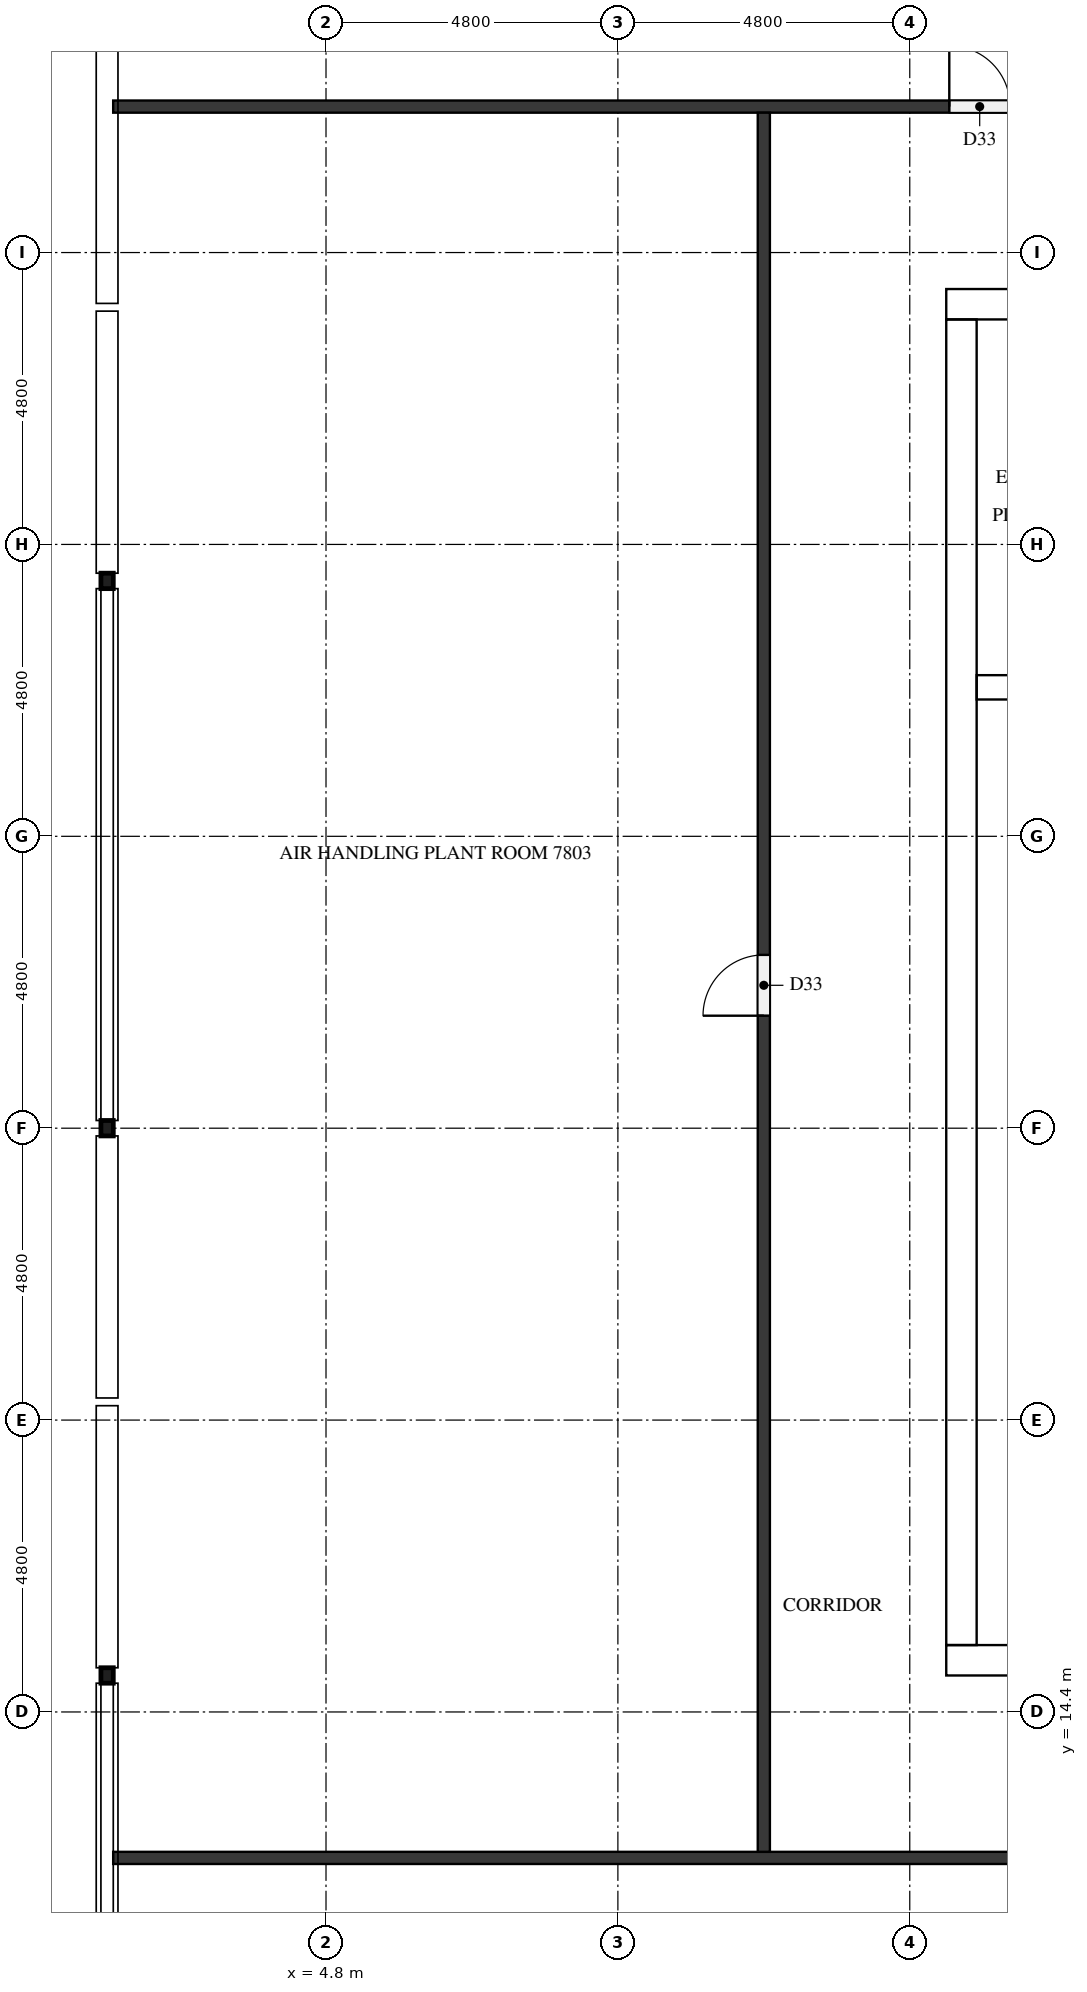
"""IFC4 building model, lengths in metres.
Left out: names, types, materials, properties, quantities, classifications, styles, units other than length and angle.
Written with IfcOpenShell. Run it as: python <this file> out.ifc"""

import sys

from ifc_helpers import new_model, si_unit, direction, frame, frame_2d, origin, origin_2d, place, context, subcontext, project, spatial, rectangle, hollow_rectangle, extrude, element, fill, save


model = new_model("IFC4")
c1 = context("Model", 3, precision=1e-05, world=origin(), true_north=direction((0.0, 1.0)))
c2 = subcontext(c1, "Body", "Model", "MODEL_VIEW")
j1 = project(units=[si_unit("LENGTHUNIT", "METRE"), si_unit("PLANEANGLEUNIT", "RADIAN")], contexts=[c1])
p1 = place(None, origin())
s1 = spatial("IfcSite", under=j1, at=p1, CompositionType="ELEMENT")
p2 = place(p1, origin())
s2 = spatial("IfcBuilding", under=s1, at=p2, CompositionType="ELEMENT")
p3 = place(p2, frame((0.0, 0.0, 301.1)))
s3 = spatial("IfcBuildingStorey", under=s2, at=p3, CompositionType="ELEMENT", Elevation=301.1)
p4 = place(p3, frame((15.0, 15.25, 0.0), z_axis=(0.0, 0.0, 1.0), x_axis=(1.0, 0.0, 0.0)))
e1 = element("IfcWall", 1, at=p4, inside=s3, PredefinedType="SHEAR", context=c2, shape_type="SweptSolid", body=[
    extrude(rectangle(XDim=32.4, YDim=0.5, at=frame_2d((16.2, 0.0))), origin(), (0.0, 0.0, 1.0), 4.4),
])
p5 = place(p4, frame((15.3, 0.0, 0.0)))
e2 = element("IfcOpeningElement", 2, at=p5, cuts=e1, PredefinedType="OPENING", context=c2, shape_type="SweptSolid", body=[
    extrude(rectangle(XDim=1.8, YDim=2.1, at=frame_2d((0.9, 1.05))), frame((0.0, 0.26, 0.0), z_axis=(0.0, -1.0, 0.0), x_axis=(1.0, 0.0, 0.0)), (0.0, 0.0, 1.0), 0.52),
])
p6 = place(p3, frame((15.0, 37.55, 0.0), z_axis=(0.0, 0.0, 1.0), x_axis=(1.0, 0.0, 0.0)))
e3 = element("IfcWall", 3, at=p6, inside=s3, PredefinedType="SHEAR", context=c2, shape_type="SweptSolid", body=[
    extrude(rectangle(XDim=32.4, YDim=0.5, at=frame_2d((16.2, 0.0))), origin(), (0.0, 0.0, 1.0), 4.4),
])
p7 = place(p6, frame((15.3, 0.0, 0.0)))
e4 = element("IfcOpeningElement", 4, at=p7, cuts=e3, PredefinedType="OPENING", context=c2, shape_type="SweptSolid", body=[
    extrude(rectangle(XDim=1.8, YDim=2.1, at=frame_2d((0.9, 1.05))), frame((0.0, 0.26, 0.0), z_axis=(0.0, -1.0, 0.0), x_axis=(1.0, 0.0, 0.0)), (0.0, 0.0, 1.0), 0.52),
])
p8 = place(p6, frame((1.282, 0.0, 0.0)))
e5 = element("IfcOpeningElement", 5, at=p8, cuts=e3, PredefinedType="OPENING", context=c2, shape_type="SweptSolid", body=[
    extrude(rectangle(XDim=1.0, YDim=2.1, at=frame_2d((0.5, 1.05))), frame((0.0, 0.26, 0.0), z_axis=(0.0, -1.0, 0.0), x_axis=(1.0, 0.0, 0.0)), (0.0, 0.0, 1.0), 0.52),
])
p9 = place(p6, frame((5.082, 0.0, 0.0)))
e6 = element("IfcOpeningElement", 6, at=p9, cuts=e3, PredefinedType="OPENING", context=c2, shape_type="SweptSolid", body=[
    extrude(rectangle(XDim=1.0, YDim=2.1, at=frame_2d((0.5, 1.05))), frame((0.0, 0.26, 0.0), z_axis=(0.0, -1.0, 0.0), x_axis=(1.0, 0.0, 0.0)), (0.0, 0.0, 1.0), 0.52),
])
p10 = place(p3, frame((15.25, 15.5, 0.0), z_axis=(0.0, 0.0, 1.0), x_axis=(0.0, 1.0, 0.0)))
e7 = element("IfcWall", 7, at=p10, inside=s3, PredefinedType="SHEAR", context=c2, shape_type="SweptSolid", body=[
    extrude(rectangle(XDim=21.8, YDim=0.5, at=frame_2d((10.9, 0.0))), origin(), (0.0, 0.0, 1.0), 4.4),
])
p11 = place(p10, frame((5.26, 0.0, 0.0)))
e8 = element("IfcOpeningElement", 8, at=p11, cuts=e7, PredefinedType="OPENING", context=c2, shape_type="SweptSolid", body=[
    extrude(rectangle(XDim=1.2, YDim=2.1, at=frame_2d((0.6, 1.05))), frame((0.0, 0.26, 0.0), z_axis=(0.0, -1.0, 0.0), x_axis=(1.0, 0.0, 0.0)), (0.0, 0.0, 1.0), 0.52),
])
p12 = place(p3, frame((15.5, 31.25, 0.0), z_axis=(0.0, 0.0, 1.0), x_axis=(1.0, 0.0, 0.0)))
e9 = element("IfcWall", 9, at=p12, inside=s3, PredefinedType="SHEAR", context=c2, shape_type="SweptSolid", body=[
    extrude(rectangle(XDim=7.4, YDim=0.4, at=frame_2d((3.7, 0.0))), origin(), (0.0, 0.0, 1.0), 4.4),
])
for number, where, z_axis, x_axis in (
    (10, (1.2, 33.0, 0.0), (0.0, 0.0, 1.0), (1.0, 0.0, 0.0)),
    (11, (1.2, 24.0, 0.0), (0.0, 0.0, 1.0), (1.0, 0.0, 0.0)),
    (12, (1.2, 15.0, 0.0), (0.0, 0.0, 1.0), (1.0, 0.0, 0.0)),
):
    element("IfcColumn", number, at=place(p3, frame(where, z_axis=z_axis, x_axis=x_axis)), inside=s3, PredefinedType="COLUMN", context=c2, shape_type="SweptSolid", body=[
        extrude(hollow_rectangle(XDim=0.203, YDim=0.254, WallThickness=0.01, InnerFilletRadius=0.004, OuterFilletRadius=0.013, at=origin_2d()), origin(), (0.0, 0.0, 1.0), 4.4),
    ])
p13 = place(p3, frame((56.3, 12.0, 0.0), z_axis=(0.0, 0.0, 1.0), x_axis=(-1.0, 0.0, 0.0)))
e13 = element("IfcWall", 13, at=p13, inside=s3, PredefinedType="PARTITIONING", context=c2, shape_type="SweptSolid", body=[
    extrude(rectangle(XDim=55.0, YDim=0.2, at=frame_2d((27.5, 0.0))), origin(), (0.0, 0.0, 1.0), 4.4),
])
p14 = place(p13, frame((37.75, 0.0, 0.0)))
e14 = element("IfcOpeningElement", 14, at=p14, cuts=e13, PredefinedType="OPENING", context=c2, shape_type="SweptSolid", body=[
    extrude(rectangle(XDim=1.0, YDim=2.1, at=frame_2d((0.5, 1.05))), frame((0.0, 0.11, 0.0), z_axis=(0.0, -1.0, 0.0), x_axis=(1.0, 0.0, 0.0)), (0.0, 0.0, 1.0), 0.22),
])
p15 = place(p13, frame((18.55, 0.0, 0.0)))
e15 = element("IfcOpeningElement", 15, at=p15, cuts=e13, PredefinedType="OPENING", context=c2, shape_type="SweptSolid", body=[
    extrude(rectangle(XDim=1.0, YDim=2.1, at=frame_2d((0.5, 1.05))), frame((0.0, 0.11, 0.0), z_axis=(0.0, -1.0, 0.0), x_axis=(1.0, 0.0, 0.0)), (0.0, 0.0, 1.0), 0.22),
])
p16 = place(p3, frame((1.3, 40.8, 0.0), z_axis=(0.0, 0.0, 1.0), x_axis=(1.0, 0.0, 0.0)))
e16 = element("IfcWall", 16, at=p16, inside=s3, PredefinedType="PARTITIONING", context=c2, shape_type="SweptSolid", body=[
    extrude(rectangle(XDim=55.0, YDim=0.2, at=frame_2d((27.5, 0.0))), origin(), (0.0, 0.0, 1.0), 4.4),
])
p17 = place(p16, frame((13.75, 0.0, 0.0)))
e17 = element("IfcOpeningElement", 17, at=p17, cuts=e16, PredefinedType="OPENING", context=c2, shape_type="SweptSolid", body=[
    extrude(rectangle(XDim=1.0, YDim=2.1, at=frame_2d((0.5, 1.05))), frame((0.0, 0.11, 0.0), z_axis=(0.0, -1.0, 0.0), x_axis=(1.0, 0.0, 0.0)), (0.0, 0.0, 1.0), 0.22),
])
p18 = place(p16, frame((32.95, 0.0, 0.0)))
e18 = element("IfcOpeningElement", 18, at=p18, cuts=e16, PredefinedType="OPENING", context=c2, shape_type="SweptSolid", body=[
    extrude(rectangle(XDim=1.0, YDim=2.1, at=frame_2d((0.5, 1.05))), frame((0.0, 0.11, 0.0), z_axis=(0.0, -1.0, 0.0), x_axis=(1.0, 0.0, 0.0)), (0.0, 0.0, 1.0), 0.22),
])
p19 = place(p3, frame((12.0, 12.1, 0.0), z_axis=(0.0, 0.0, 1.0), x_axis=(0.0, 1.0, 0.0)))
e19 = element("IfcWall", 19, at=p19, inside=s3, PredefinedType="PARTITIONING", context=c2, shape_type="SweptSolid", body=[
    extrude(rectangle(XDim=28.6, YDim=0.2, at=frame_2d((14.3, 0.0))), origin(), (0.0, 0.0, 1.0), 4.4),
])
p20 = place(p19, frame((13.75, 0.0, 0.0)))
e20 = element("IfcOpeningElement", 20, at=p20, cuts=e19, PredefinedType="OPENING", context=c2, shape_type="SweptSolid", body=[
    extrude(rectangle(XDim=1.0, YDim=2.1, at=frame_2d((0.5, 1.05))), frame((0.0, 0.11, 0.0), z_axis=(0.0, -1.0, 0.0), x_axis=(1.0, 0.0, 0.0)), (0.0, 0.0, 1.0), 0.22),
])
p21 = place(p11, frame((1.2, 0.0, 0.0), z_axis=(0.0, 0.0, 1.0), x_axis=(-1.0, 0.0, 0.0)))
e21 = element("IfcDoor", 21, at=p21, inside=s3, OperationType="SINGLE_SWING_LEFT", PredefinedType="DOOR", context=c2, shape_type="SweptSolid", body=[
    extrude(rectangle(XDim=1.2, YDim=2.1, at=frame_2d((0.6, 1.05))), frame((0.0, 0.025, 0.0), z_axis=(0.0, -1.0, 0.0), x_axis=(1.0, 0.0, 0.0)), (0.0, 0.0, 1.0), 0.05),
])
fill(e8, e21)
p22 = place(p20, origin())
e22 = element("IfcDoor", 22, at=p22, inside=s3, OperationType="SINGLE_SWING_LEFT", PredefinedType="DOOR", context=c2, shape_type="SweptSolid", body=[
    extrude(rectangle(XDim=1.0, YDim=2.1, at=frame_2d((0.5, 1.05))), frame((0.0, 0.025, 0.0), z_axis=(0.0, -1.0, 0.0), x_axis=(1.0, 0.0, 0.0)), (0.0, 0.0, 1.0), 0.05),
])
fill(e20, e22)
p23 = place(p17, origin())
e23 = element("IfcDoor", 23, at=p23, inside=s3, OperationType="SINGLE_SWING_LEFT", PredefinedType="DOOR", context=c2, shape_type="SweptSolid", body=[
    extrude(rectangle(XDim=1.0, YDim=2.1, at=frame_2d((0.5, 1.05))), frame((0.0, 0.025, 0.0), z_axis=(0.0, -1.0, 0.0), x_axis=(1.0, 0.0, 0.0)), (0.0, 0.0, 1.0), 0.05),
])
fill(e17, e23)
save(model, sys.argv[1])
